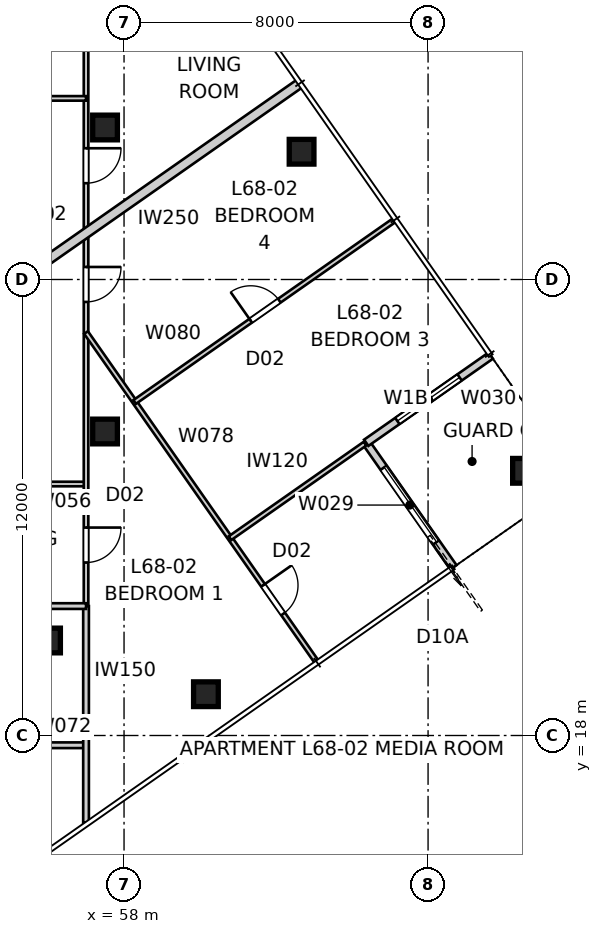
"""IFC4 building model, lengths in metres.
Left out: names, types, materials, properties, quantities, classifications, styles, units other than length and angle.
Written with IfcOpenShell. Run it as: python <this file> out.ifc"""

import sys

from ifc_helpers import new_model, si_unit, direction, frame, frame_2d, origin, origin_2d, place, context, subcontext, project, spatial, rectangle, extrude, element, fill, save


model = new_model("IFC4")
c1 = context("Model", 3, precision=1e-05, world=origin(), true_north=direction((0.0, 1.0)))
c2 = subcontext(c1, "Body", "Model", "MODEL_VIEW")
j1 = project(units=[si_unit("LENGTHUNIT", "METRE"), si_unit("PLANEANGLEUNIT", "RADIAN")], contexts=[c1])
p1 = place(None, origin())
s1 = spatial("IfcSite", under=j1, at=p1, CompositionType="ELEMENT")
p2 = place(p1, origin())
s2 = spatial("IfcBuilding", under=s1, at=p2, CompositionType="ELEMENT")
p3 = place(p2, frame((0.0, 0.0, 247.2)))
s3 = spatial("IfcBuildingStorey", under=s2, at=p3, CompositionType="ELEMENT", Elevation=247.2)
for number, where, z_axis, x_axis in (
    (1, (60.155, 19.086, 0.0), (0.0, 0.0, 1.0), (1.0, 0.0, 0.0)),
    (2, (68.551, 24.966, 0.0), (0.0, 0.0, 1.0), (1.0, 0.0, 0.0)),
    (3, (62.672, 33.362, 0.0), (0.0, 0.0, 1.0), (1.0, 0.0, 0.0)),
    (4, (57.5, 26.0, 0.0), (0.0, 0.0, 1.0), (1.0, 0.0, 0.0)),
    (5, (57.5, 34.0, 0.0), (0.0, 0.0, 1.0), (1.0, 0.0, 0.0)),
    (6, (56.0, 20.5, 0.0), (0.0, 0.0, 1.0), (1.0, 0.0, 0.0)),
):
    element("IfcColumn", number, at=place(p3, frame(where, z_axis=z_axis, x_axis=x_axis)), inside=s3, PredefinedType="COLUMN", context=c2, shape_type="SweptSolid", body=[
        extrude(rectangle(XDim=0.65, YDim=0.65, at=origin_2d()), origin(), (0.0, 0.0, 1.0), 3.4),
    ])
p4 = place(p3, frame((66.667, 22.426, 0.0), z_axis=(0.0, 0.0, 1.0), x_axis=(-0.573556557423, 0.819165963305, 0.0)))
e7 = element("IfcWall", 7, at=p4, inside=s3, PredefinedType="SOLIDWALL", context=c2, shape_type="SweptSolid", body=[
    extrude(rectangle(XDim=4.0, YDim=0.2, at=frame_2d((2.0, 0.0))), origin(), (0.0, 0.0, 1.0), 3.25),
])
p5 = place(p4, frame((0.8, 0.0, 0.0)))
e8 = element("IfcOpeningElement", 8, at=p5, cuts=e7, PredefinedType="OPENING", context=c2, shape_type="SweptSolid", body=[
    extrude(rectangle(XDim=2.4, YDim=2.1, at=frame_2d((1.2, 1.05))), frame((0.0, 0.11, 0.0), z_axis=(0.0, -1.0, 0.0), x_axis=(1.0, 0.0, 0.0)), (0.0, 0.0, 1.0), 0.22),
])
p6 = place(p3, frame((64.373, 25.702, 0.0), z_axis=(0.0, 0.0, 1.0), x_axis=(0.819137286189, 0.573597512525, 0.0)))
e9 = element("IfcWall", 9, at=p6, inside=s3, PredefinedType="SOLIDWALL", context=c2, shape_type="SweptSolid", body=[
    extrude(rectangle(XDim=4.0, YDim=0.2, at=frame_2d((2.0, 0.0))), origin(), (0.0, 0.0, 1.0), 3.25),
])
p7 = place(p6, frame((1.0, 0.0, 0.45)))
e10 = element("IfcOpeningElement", 10, at=p7, cuts=e9, PredefinedType="OPENING", context=c2, shape_type="SweptSolid", body=[
    extrude(rectangle(XDim=2.0, YDim=1.8, at=frame_2d((1.0, 0.9))), frame((0.0, 0.11, 0.0), z_axis=(0.0, -1.0, 0.0), x_axis=(1.0, 0.0, 0.0)), (0.0, 0.0, 1.0), 0.22),
])
p8 = place(p3, frame((62.631, 35.164, 0.0), z_axis=(0.0, 0.0, 1.0), x_axis=(-0.81915902312, -0.573566469418, 0.0)))
e11 = element("IfcWall", 11, at=p8, inside=s3, PredefinedType="PARTITIONING", context=c2, shape_type="SweptSolid", body=[
    extrude(rectangle(XDim=9.756, YDim=0.25, at=frame_2d((4.878, 0.0))), origin(), (0.0, 0.0, 1.0), 3.25),
])
p9 = place(p3, frame((57.0, 24.618, 0.0), z_axis=(0.0, 0.0, 1.0), x_axis=(-1.0, 0.0, 0.0)))
e12 = element("IfcWall", 12, at=p9, inside=s3, PredefinedType="PARTITIONING", context=c2, shape_type="SweptSolid", body=[
    extrude(rectangle(XDim=4.9, YDim=0.12, at=frame_2d((2.45, 0.0))), origin(), (0.0, 0.0, 1.0), 3.25),
])
p10 = place(p9, frame((1.99, 0.0, 0.0)))
e13 = element("IfcOpeningElement", 13, at=p10, cuts=e12, PredefinedType="OPENING", context=c2, shape_type="SweptSolid", body=[
    extrude(rectangle(XDim=0.92, YDim=2.34, at=frame_2d((0.46, 1.17))), frame((0.0, 0.07, 0.0), z_axis=(0.0, -1.0, 0.0), x_axis=(1.0, 0.0, 0.0)), (0.0, 0.0, 1.0), 0.14),
])
p11 = place(p3, frame((57.0, 41.904, 0.0), z_axis=(0.0, 0.0, 1.0), x_axis=(0.0, -1.0, 0.0)))
e14 = element("IfcWall", 14, at=p11, inside=s3, PredefinedType="PARTITIONING", context=c2, shape_type="SweptSolid", body=[
    extrude(rectangle(XDim=20.498, YDim=0.12, at=frame_2d((10.249, 0.0))), origin(), (0.0, 0.0, 1.0), 2.55),
])
p12 = place(p11, frame((8.449, 0.0, 0.0)))
e15 = element("IfcOpeningElement", 15, at=p12, cuts=e14, PredefinedType="OPENING", context=c2, shape_type="SweptSolid", body=[
    extrude(rectangle(XDim=0.92, YDim=2.34, at=frame_2d((0.46, 1.17))), frame((0.0, 0.07, 0.0), z_axis=(0.0, -1.0, 0.0), x_axis=(1.0, 0.0, 0.0)), (0.0, 0.0, 1.0), 0.14),
])
p13 = place(p11, frame((11.574, 0.0, 0.0)))
e16 = element("IfcOpeningElement", 16, at=p13, cuts=e14, PredefinedType="OPENING", context=c2, shape_type="SweptSolid", body=[
    extrude(rectangle(XDim=0.92, YDim=2.34, at=frame_2d((0.46, 1.17))), frame((0.0, 0.07, 0.0), z_axis=(0.0, -1.0, 0.0), x_axis=(1.0, 0.0, 0.0)), (0.0, 0.0, 1.0), 0.14),
])
p14 = place(p11, frame((18.432, 0.0, 0.0)))
e17 = element("IfcOpeningElement", 17, at=p14, cuts=e14, PredefinedType="OPENING", context=c2, shape_type="SweptSolid", body=[
    extrude(rectangle(XDim=0.92, YDim=2.34, at=frame_2d((0.46, 1.17))), frame((0.0, 0.07, 0.0), z_axis=(0.0, -1.0, 0.0), x_axis=(1.0, 0.0, 0.0)), (0.0, 0.0, 1.0), 0.14),
])
p15 = place(p3, frame((52.109, 17.743, 0.0), z_axis=(0.0, 0.0, 1.0), x_axis=(1.0, 0.0, 0.0)))
e18 = element("IfcWall", 18, at=p15, inside=s3, PredefinedType="SOLIDWALL", context=c2, shape_type="SweptSolid", body=[
    extrude(rectangle(XDim=4.891, YDim=0.15, at=frame_2d((2.446, 0.0))), origin(), (0.0, 0.0, 1.0), 3.25),
])
p16 = place(p15, frame((1.986, 0.0, 0.0)))
e19 = element("IfcOpeningElement", 19, at=p16, cuts=e18, PredefinedType="OPENING", context=c2, shape_type="SweptSolid", body=[
    extrude(rectangle(XDim=0.92, YDim=2.34, at=frame_2d((0.46, 1.17))), frame((0.0, 0.085, 0.0), z_axis=(0.0, -1.0, 0.0), x_axis=(1.0, 0.0, 0.0)), (0.0, 0.0, 1.0), 0.17),
])
p17 = place(p3, frame((57.0, 21.406, 0.0), z_axis=(0.0, 0.0, 1.0), x_axis=(0.0, -1.0, 0.0)))
e20 = element("IfcWall", 20, at=p17, inside=s3, PredefinedType="SOLIDWALL", context=c2, shape_type="SweptSolid", body=[
    extrude(rectangle(XDim=5.7, YDim=0.15, at=frame_2d((2.85, 0.0))), origin(), (0.0, 0.0, 1.0), 3.25),
])
p18 = place(p3, frame((57.0, 21.406, 0.0), z_axis=(0.0, 0.0, 1.0), x_axis=(-1.0, 0.0, 0.0)))
e21 = element("IfcWall", 21, at=p18, inside=s3, PredefinedType="SOLIDWALL", context=c2, shape_type="SweptSolid", body=[
    extrude(rectangle(XDim=4.9, YDim=0.15, at=frame_2d((2.45, 0.0))), origin(), (0.0, 0.0, 1.0), 3.25),
])
p19 = place(p18, frame((1.99, 0.0, 0.0)))
e22 = element("IfcOpeningElement", 22, at=p19, cuts=e21, PredefinedType="OPENING", context=c2, shape_type="SweptSolid", body=[
    extrude(rectangle(XDim=0.92, YDim=2.34, at=frame_2d((0.46, 1.17))), frame((0.0, 0.085, 0.0), z_axis=(0.0, -1.0, 0.0), x_axis=(1.0, 0.0, 0.0)), (0.0, 0.0, 1.0), 0.17),
])
p20 = place(p3, frame((57.0, 28.604, 0.0), z_axis=(0.0, 0.0, 1.0), x_axis=(0.573575545802, -0.819152667857, 0.0)))
e23 = element("IfcWall", 23, at=p20, inside=s3, PredefinedType="PARTITIONING", context=c2, shape_type="SweptSolid", body=[
    extrude(rectangle(XDim=10.566, YDim=0.12, at=frame_2d((5.283, 0.0))), origin(), (0.0, 0.0, 1.0), 3.25),
])
p21 = place(p20, frame((8.121, 0.0, 0.0)))
e24 = element("IfcOpeningElement", 24, at=p21, cuts=e23, PredefinedType="OPENING", context=c2, shape_type="SweptSolid", body=[
    extrude(rectangle(XDim=0.92, YDim=2.34, at=frame_2d((0.46, 1.17))), frame((0.0, 0.07, 0.0), z_axis=(0.0, -1.0, 0.0), x_axis=(1.0, 0.0, 0.0)), (0.0, 0.0, 1.0), 0.14),
])
p22 = place(p3, frame((58.28, 26.777, 0.0), z_axis=(0.0, 0.0, 1.0), x_axis=(0.819152099525, 0.573576357466, 0.0)))
e25 = element("IfcWall", 25, at=p22, inside=s3, PredefinedType="PARTITIONING", context=c2, shape_type="SweptSolid", body=[
    extrude(rectangle(XDim=8.335, YDim=0.12, at=frame_2d((4.167, 0.0))), origin(), (0.0, 0.0, 1.0), 3.25),
])
p23 = place(p22, frame((3.728, 0.0, 0.0)))
e26 = element("IfcOpeningElement", 26, at=p23, cuts=e25, PredefinedType="OPENING", context=c2, shape_type="SweptSolid", body=[
    extrude(rectangle(XDim=0.92, YDim=2.34, at=frame_2d((0.46, 1.17))), frame((0.0, 0.07, 0.0), z_axis=(0.0, -1.0, 0.0), x_axis=(1.0, 0.0, 0.0)), (0.0, 0.0, 1.0), 0.14),
])
p24 = place(p3, frame((64.34, 25.679, 0.0), z_axis=(0.0, 0.0, 1.0), x_axis=(-0.819165768115, -0.573556836197, 0.0)))
e27 = element("IfcWall", 27, at=p24, inside=s3, PredefinedType="PARTITIONING", context=c2, shape_type="SweptSolid", body=[
    extrude(rectangle(XDim=4.335, YDim=0.12, at=frame_2d((2.167, 0.0))), origin(), (0.0, 0.0, 1.0), 3.25),
])
p25 = place(p3, frame((52.1, 34.766, 0.0), z_axis=(0.0, 0.0, 1.0), x_axis=(1.0, 0.0, 0.0)))
e28 = element("IfcWall", 28, at=p25, inside=s3, PredefinedType="PARTITIONING", context=c2, shape_type="SweptSolid", body=[
    extrude(rectangle(XDim=4.9, YDim=0.12, at=frame_2d((2.45, 0.0))), origin(), (0.0, 0.0, 1.0), 3.25),
])
p26 = place(p25, frame((2.59, 0.0, 0.0)))
e29 = element("IfcOpeningElement", 29, at=p26, cuts=e28, PredefinedType="OPENING", context=c2, shape_type="SweptSolid", body=[
    extrude(rectangle(XDim=0.92, YDim=2.34, at=frame_2d((0.46, 1.17))), frame((0.0, 0.07, 0.0), z_axis=(0.0, -1.0, 0.0), x_axis=(1.0, 0.0, 0.0)), (0.0, 0.0, 1.0), 0.14),
])
p27 = place(p5, origin())
e30 = element("IfcDoor", 30, at=p27, inside=s3, OperationType="SLIDING_TO_LEFT", PredefinedType="DOOR", context=c2, shape_type="SweptSolid", body=[
    extrude(rectangle(XDim=2.4, YDim=2.1, at=frame_2d((1.2, 1.05))), frame((0.0, 0.025, 0.0), z_axis=(0.0, -1.0, 0.0), x_axis=(1.0, 0.0, 0.0)), (0.0, 0.0, 1.0), 0.05),
])
fill(e8, e30)
p28 = place(p7, origin())
e31 = element("IfcWindow", 31, at=p28, inside=s3, PartitioningType="SINGLE_PANEL", PredefinedType="WINDOW", context=c2, shape_type="SweptSolid", body=[
    extrude(rectangle(XDim=2.0, YDim=1.8, at=frame_2d((1.0, 0.9))), frame((0.0, 0.03, 0.0), z_axis=(0.0, -1.0, 0.0), x_axis=(1.0, 0.0, 0.0)), (0.0, 0.0, 1.0), 0.06),
])
fill(e10, e31)
p29 = place(p12, origin())
e32 = element("IfcDoor", 32, at=p29, inside=s3, OperationType="SINGLE_SWING_LEFT", PredefinedType="DOOR", context=c2, shape_type="SweptSolid", body=[
    extrude(rectangle(XDim=0.92, YDim=2.34, at=frame_2d((0.46, 1.17))), frame((0.0, 0.025, 0.0), z_axis=(0.0, -1.0, 0.0), x_axis=(1.0, 0.0, 0.0)), (0.0, 0.0, 1.0), 0.05),
])
fill(e15, e32)
p30 = place(p13, origin())
e33 = element("IfcDoor", 33, at=p30, inside=s3, OperationType="SINGLE_SWING_LEFT", PredefinedType="DOOR", context=c2, shape_type="SweptSolid", body=[
    extrude(rectangle(XDim=0.92, YDim=2.34, at=frame_2d((0.46, 1.17))), frame((0.0, 0.025, 0.0), z_axis=(0.0, -1.0, 0.0), x_axis=(1.0, 0.0, 0.0)), (0.0, 0.0, 1.0), 0.05),
])
fill(e16, e33)
p31 = place(p14, origin())
e34 = element("IfcDoor", 34, at=p31, inside=s3, OperationType="SINGLE_SWING_LEFT", PredefinedType="DOOR", context=c2, shape_type="SweptSolid", body=[
    extrude(rectangle(XDim=0.92, YDim=2.34, at=frame_2d((0.46, 1.17))), frame((0.0, 0.025, 0.0), z_axis=(0.0, -1.0, 0.0), x_axis=(1.0, 0.0, 0.0)), (0.0, 0.0, 1.0), 0.05),
])
fill(e17, e34)
p32 = place(p23, origin())
e35 = element("IfcDoor", 35, at=p32, inside=s3, OperationType="SINGLE_SWING_LEFT", PredefinedType="DOOR", context=c2, shape_type="SweptSolid", body=[
    extrude(rectangle(XDim=0.92, YDim=2.34, at=frame_2d((0.46, 1.17))), frame((0.0, 0.025, 0.0), z_axis=(0.0, -1.0, 0.0), x_axis=(1.0, 0.0, 0.0)), (0.0, 0.0, 1.0), 0.05),
])
fill(e26, e35)
p33 = place(p21, origin())
e36 = element("IfcDoor", 36, at=p33, inside=s3, OperationType="SINGLE_SWING_LEFT", PredefinedType="DOOR", context=c2, shape_type="SweptSolid", body=[
    extrude(rectangle(XDim=0.92, YDim=2.34, at=frame_2d((0.46, 1.17))), frame((0.0, 0.025, 0.0), z_axis=(0.0, -1.0, 0.0), x_axis=(1.0, 0.0, 0.0)), (0.0, 0.0, 1.0), 0.05),
])
fill(e24, e36)
save(model, sys.argv[1])
